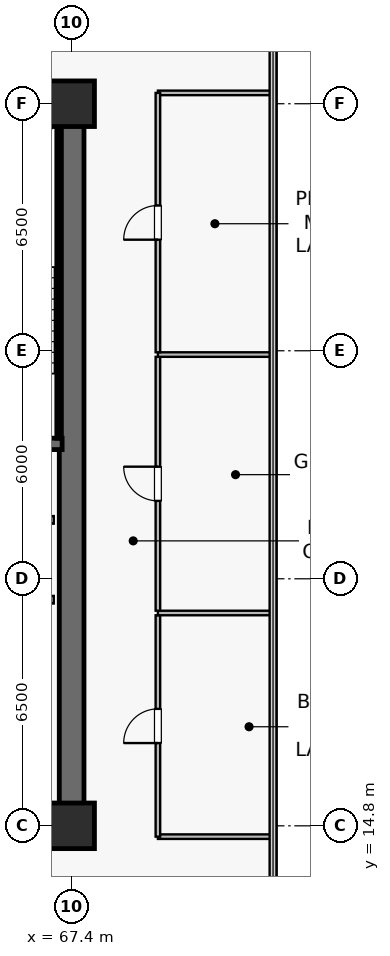
"""IFC4 building model, lengths in metres.
Left out: names, types, materials, properties, quantities, classifications, styles, units other than length and angle.
Written with IfcOpenShell. Run it as: python <this file> out.ifc"""

import sys

from ifc_helpers import new_model, si_unit, direction, frame, frame_2d, origin, origin_2d, place, context, subcontext, project, spatial, rectangle, extrude, source, transform, mapped, element, fill, save


model = new_model("IFC4")
c1 = context("Model", 3, precision=1e-05, world=origin(), true_north=direction((0.0, 1.0)))
c2 = subcontext(c1, "Body", "Model", "MODEL_VIEW")
j1 = project(units=[si_unit("LENGTHUNIT", "METRE"), si_unit("PLANEANGLEUNIT", "RADIAN")], contexts=[c1])
p1 = place(None, origin())
s1 = spatial("IfcSite", under=j1, at=p1, CompositionType="ELEMENT")
p2 = place(p1, origin())
s2 = spatial("IfcBuilding", under=s1, at=p2, CompositionType="ELEMENT")
p3 = place(p2, frame((0.0, 0.0, 170.7)))
s3 = spatial("IfcBuildingStorey", under=s2, at=p3, CompositionType="ELEMENT", Elevation=170.7)
p4 = place(p3, frame((52.275, 14.8, 0.0), z_axis=(0.0, 0.0, 1.0), x_axis=(1.0, 0.0, 0.0)))
e1 = element("IfcWall", 1, at=p4, inside=s3, PredefinedType="SHEAR", context=c2, shape_type="SweptSolid", body=[
    extrude(rectangle(XDim=15.45, YDim=0.65, at=frame_2d((7.725, 0.0))), origin(), (0.0, 0.0, 1.0), 3.79),
])
p5 = place(p3, frame((52.275, 33.8, 0.0), z_axis=(0.0, 0.0, 1.0), x_axis=(1.0, 0.0, 0.0)))
e2 = element("IfcWall", 2, at=p5, inside=s3, PredefinedType="SHEAR", context=c2, shape_type="SweptSolid", body=[
    extrude(rectangle(XDim=15.45, YDim=0.65, at=frame_2d((7.725, 0.0))), origin(), (0.0, 0.0, 1.0), 3.79),
])
p6 = place(p5, frame((9.25, 0.0, 0.0)))
e3 = element("IfcOpeningElement", 3, at=p6, cuts=e2, PredefinedType="OPENING", context=c2, shape_type="SweptSolid", body=[
    extrude(rectangle(XDim=0.95, YDim=2.15, at=frame_2d((0.475, 1.075))), frame((0.0, 0.335, 0.0), z_axis=(0.0, -1.0, 0.0), x_axis=(1.0, 0.0, 0.0)), (0.0, 0.0, 1.0), 0.67),
])
p7 = place(p5, frame((6.735, 0.0, 0.0)))
e4 = element("IfcOpeningElement", 4, at=p7, cuts=e2, PredefinedType="OPENING", context=c2, shape_type="SweptSolid", body=[
    extrude(rectangle(XDim=0.95, YDim=2.15, at=frame_2d((0.475, 1.075))), frame((0.0, 0.335, 0.0), z_axis=(0.0, -1.0, 0.0), x_axis=(1.0, 0.0, 0.0)), (0.0, 0.0, 1.0), 0.67),
])
p8 = place(p5, frame((4.185, 0.0, 0.0)))
e5 = element("IfcOpeningElement", 5, at=p8, cuts=e2, PredefinedType="OPENING", context=c2, shape_type="SweptSolid", body=[
    extrude(rectangle(XDim=0.95, YDim=2.15, at=frame_2d((0.475, 1.075))), frame((0.0, 0.335, 0.0), z_axis=(0.0, -1.0, 0.0), x_axis=(1.0, 0.0, 0.0)), (0.0, 0.0, 1.0), 0.67),
])
p9 = place(p5, frame((1.635, 0.0, 0.0)))
e6 = element("IfcOpeningElement", 6, at=p9, cuts=e2, PredefinedType="OPENING", context=c2, shape_type="SweptSolid", body=[
    extrude(rectangle(XDim=0.95, YDim=2.15, at=frame_2d((0.475, 1.075))), frame((0.0, 0.335, 0.0), z_axis=(0.0, -1.0, 0.0), x_axis=(1.0, 0.0, 0.0)), (0.0, 0.0, 1.0), 0.67),
])
p10 = place(p3, frame((67.4, 15.125, 0.0), z_axis=(0.0, 0.0, 1.0), x_axis=(0.0, 1.0, 0.0)))
e7 = element("IfcWall", 7, at=p10, inside=s3, PredefinedType="SHEAR", context=c2, shape_type="SweptSolid", body=[
    extrude(rectangle(XDim=18.35, YDim=0.65, at=frame_2d((9.175, 0.0))), origin(), (0.0, 0.0, 1.0), 3.79),
])
p11 = place(p3, frame((63.35, 24.85, 0.0), z_axis=(0.0, 0.0, 1.0), x_axis=(1.0, 0.0, 0.0)))
e8 = element("IfcWall", 8, at=p11, inside=s3, PredefinedType="SHEAR", context=c2, shape_type="SweptSolid", body=[
    extrude(rectangle(XDim=3.8, YDim=0.3, at=frame_2d((1.9, 0.0))), origin(), (0.0, 0.0, 1.0), 3.79),
])
p12 = place(p3, frame((63.35, 33.4, 0.0), z_axis=(0.0, 0.0, 1.0), x_axis=(1.0, 0.0, 0.0)))
e9 = element("IfcWall", 9, at=p12, inside=s3, PredefinedType="SOLIDWALL", context=c2, shape_type="SweptSolid", body=[
    extrude(rectangle(XDim=3.72, YDim=0.12, at=frame_2d((1.86, 0.0))), origin(), (0.0, 0.0, 1.0), 3.79),
])
p13 = place(p3, frame((67.07, 25.0, 0.0), z_axis=(0.0, 0.0, 1.0), x_axis=(0.0, 1.0, 0.0)))
e10 = element("IfcWall", 10, at=p13, inside=s3, PredefinedType="SOLIDWALL", context=c2, shape_type="SweptSolid", body=[
    extrude(rectangle(XDim=8.32, YDim=0.12, at=frame_2d((4.16, 0.0))), origin(), (0.0, 0.0, 1.0), 3.79),
])
m1 = source(origin(), c2, "Body", "SweptSolid", [
    extrude(rectangle(XDim=1.2, YDim=1.2, at=origin_2d()), origin(), (0.0, 0.0, 1.0), 4.1),
])
for number, where, z_axis, x_axis in (
    (11, (67.4, 14.8, 0.0), (0.0, 0.0, 1.0), (1.0, 0.0, 0.0)),
    (12, (67.4, 33.8, 0.0), (0.0, 0.0, 1.0), (1.0, 0.0, 0.0)),
):
    element("IfcColumn", number, at=place(p3, frame(where, z_axis=z_axis, x_axis=x_axis)), inside=s3, PredefinedType="COLUMN", context=c2, shape_type="MappedRepresentation", body=[
        mapped(m1, transform((0.0, 0.0, 0.0), scale=1.0)),
    ])
for number, where, z_axis, x_axis in (
    (13, (64.67, 20.75, 0.0), (0.0, 0.0, 1.0), (1.0, 0.0, 0.0)),
    (14, (64.67, 22.85, 0.0), (0.0, 0.0, 1.0), (1.0, 0.0, 0.0)),
):
    element("IfcWall", number, at=place(p3, frame(where, z_axis=z_axis, x_axis=x_axis)), inside=s3, PredefinedType="SOLIDWALL", context=c2, shape_type="SweptSolid", body=[
        extrude(rectangle(XDim=2.26, YDim=0.2, at=frame_2d((1.13, 0.0))), origin(), (0.0, 0.0, 1.0), 3.79),
    ])
for number, where, z_axis, x_axis in (
    (15, (69.67, 14.515, 0.0), (0.0, 0.0, 1.0), (1.0, 0.0, 0.0)),
    (16, (69.67, 34.085, 0.0), (0.0, 0.0, 1.0), (1.0, 0.0, 0.0)),
):
    element("IfcWall", number, at=place(p3, frame(where, z_axis=z_axis, x_axis=x_axis)), inside=s3, PredefinedType="PARTITIONING", context=c2, shape_type="SweptSolid", body=[
        extrude(rectangle(XDim=3.02, YDim=0.12, at=frame_2d((1.51, 0.0))), origin(), (0.0, 0.0, 1.0), 3.79),
    ])
p14 = place(p3, frame((69.67, 14.515, 0.0), z_axis=(0.0, 0.0, 1.0), x_axis=(0.0, 1.0, 0.0)))
e17 = element("IfcWall", 17, at=p14, inside=s3, PredefinedType="PARTITIONING", context=c2, shape_type="SweptSolid", body=[
    extrude(rectangle(XDim=5.825, YDim=0.12, at=frame_2d((2.913, 0.0))), origin(), (0.0, 0.0, 1.0), 3.79),
])
p15 = place(p14, frame((2.462, 0.0, 0.0)))
e18 = element("IfcOpeningElement", 18, at=p15, cuts=e17, PredefinedType="OPENING", context=c2, shape_type="SweptSolid", body=[
    extrude(rectangle(XDim=0.9, YDim=2.1, at=frame_2d((0.45, 1.05))), frame((0.0, 0.07, 0.0), z_axis=(0.0, -1.0, 0.0), x_axis=(1.0, 0.0, 0.0)), (0.0, 0.0, 1.0), 0.14),
])
p16 = place(p3, frame((69.67, 20.4, 0.0), z_axis=(0.0, 0.0, 1.0), x_axis=(1.0, 0.0, 0.0)))
e19 = element("IfcWall", 19, at=p16, inside=s3, PredefinedType="PARTITIONING", context=c2, shape_type="SweptSolid", body=[
    extrude(rectangle(XDim=3.02, YDim=0.12, at=frame_2d((1.51, 0.0))), origin(), (0.0, 0.0, 1.0), 3.79),
])
p17 = place(p3, frame((69.67, 20.46, 0.0), z_axis=(0.0, 0.0, 1.0), x_axis=(0.0, 1.0, 0.0)))
e20 = element("IfcWall", 20, at=p17, inside=s3, PredefinedType="PARTITIONING", context=c2, shape_type="SweptSolid", body=[
    extrude(rectangle(XDim=6.68, YDim=0.12, at=frame_2d((3.34, 0.0))), origin(), (0.0, 0.0, 1.0), 3.79),
])
p18 = place(p17, frame((2.89, 0.0, 0.0)))
e21 = element("IfcOpeningElement", 21, at=p18, cuts=e20, PredefinedType="OPENING", context=c2, shape_type="SweptSolid", body=[
    extrude(rectangle(XDim=0.9, YDim=2.1, at=frame_2d((0.45, 1.05))), frame((0.0, 0.07, 0.0), z_axis=(0.0, -1.0, 0.0), x_axis=(1.0, 0.0, 0.0)), (0.0, 0.0, 1.0), 0.14),
])
p19 = place(p3, frame((69.67, 27.2, 0.0), z_axis=(0.0, 0.0, 1.0), x_axis=(1.0, 0.0, 0.0)))
e22 = element("IfcWall", 22, at=p19, inside=s3, PredefinedType="PARTITIONING", context=c2, shape_type="SweptSolid", body=[
    extrude(rectangle(XDim=3.02, YDim=0.12, at=frame_2d((1.51, 0.0))), origin(), (0.0, 0.0, 1.0), 3.79),
])
p20 = place(p3, frame((69.67, 27.26, 0.0), z_axis=(0.0, 0.0, 1.0), x_axis=(0.0, 1.0, 0.0)))
e23 = element("IfcWall", 23, at=p20, inside=s3, PredefinedType="PARTITIONING", context=c2, shape_type="SweptSolid", body=[
    extrude(rectangle(XDim=6.825, YDim=0.12, at=frame_2d((3.413, 0.0))), origin(), (0.0, 0.0, 1.0), 3.79),
])
p21 = place(p20, frame((2.962, 0.0, 0.0)))
e24 = element("IfcOpeningElement", 24, at=p21, cuts=e23, PredefinedType="OPENING", context=c2, shape_type="SweptSolid", body=[
    extrude(rectangle(XDim=0.9, YDim=2.1, at=frame_2d((0.45, 1.05))), frame((0.0, 0.07, 0.0), z_axis=(0.0, -1.0, 0.0), x_axis=(1.0, 0.0, 0.0)), (0.0, 0.0, 1.0), 0.14),
])
m2 = source(origin(), c2, "Body", "SweptSolid", [
    extrude(rectangle(XDim=0.9, YDim=2.1, at=frame_2d((0.45, 1.05))), frame((0.0, 0.025, 0.0), z_axis=(0.0, -1.0, 0.0), x_axis=(1.0, 0.0, 0.0)), (0.0, 0.0, 1.0), 0.05),
])
p22 = place(p15, origin())
e25 = element("IfcDoor", 25, at=p22, inside=s3, OperationType="SINGLE_SWING_LEFT", PredefinedType="DOOR", context=c2, shape_type="MappedRepresentation", body=[
    mapped(m2, transform((0.0, 0.0, 0.0), scale=1.0)),
])
fill(e18, e25)
p23 = place(p18, origin())
e26 = element("IfcDoor", 26, at=p23, inside=s3, OperationType="SINGLE_SWING_RIGHT", PredefinedType="DOOR", context=c2, shape_type="MappedRepresentation", body=[
    mapped(m2, transform((0.0, 0.0, 0.0), scale=1.0)),
])
fill(e21, e26)
p24 = place(p21, origin())
e27 = element("IfcDoor", 27, at=p24, inside=s3, OperationType="SINGLE_SWING_LEFT", PredefinedType="DOOR", context=c2, shape_type="MappedRepresentation", body=[
    mapped(m2, transform((0.0, 0.0, 0.0), scale=1.0)),
])
fill(e24, e27)
save(model, sys.argv[1])
